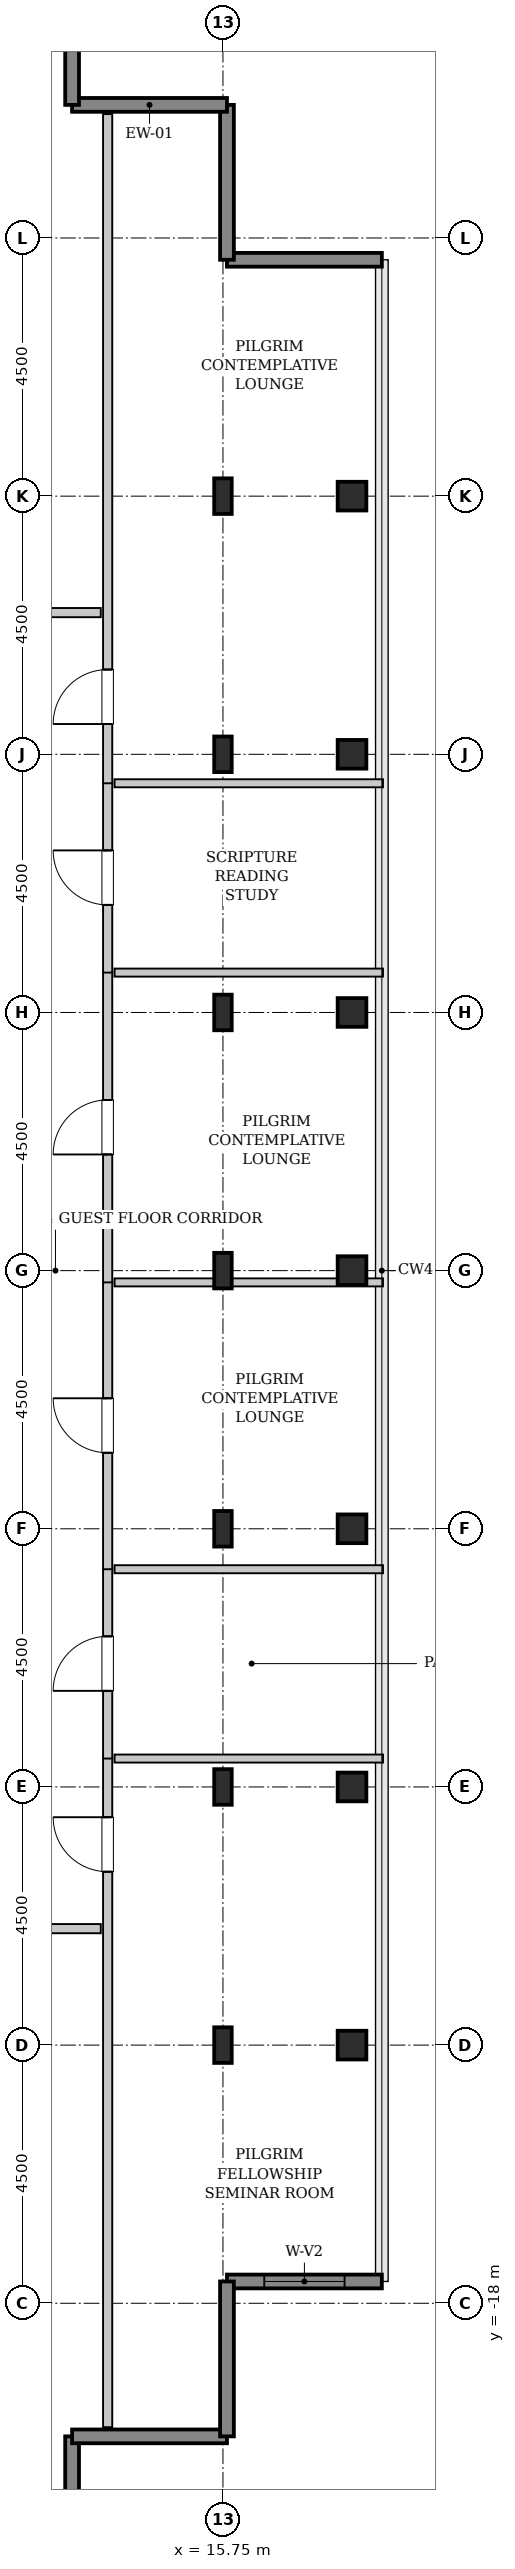
"""IFC4 building model, lengths in metres.
Left out: names, types, materials, properties, quantities, classifications, styles, units other than length and angle.
Written with IfcOpenShell. Run it as: python <this file> out.ifc"""

import sys

from ifc_helpers import new_model, si_unit, direction, frame, frame_2d, origin, origin_2d, place, context, subcontext, project, spatial, rectangle, hollow_rectangle, i_section, extrude, source, transform, mapped, element, fill, save


model = new_model("IFC4")
c1 = context("Model", 3, precision=1e-05, world=origin(), true_north=direction((0.0, 1.0)))
c2 = subcontext(c1, "Body", "Model", "MODEL_VIEW")
j1 = project(units=[si_unit("LENGTHUNIT", "METRE"), si_unit("PLANEANGLEUNIT", "RADIAN")], contexts=[c1])
p1 = place(None, origin())
s1 = spatial("IfcSite", under=j1, at=p1, CompositionType="ELEMENT")
p2 = place(p1, origin())
s2 = spatial("IfcBuilding", under=s1, at=p2, CompositionType="ELEMENT")
p3 = place(p2, frame((0.0, 0.0, 295.0)))
s3 = spatial("IfcBuildingStorey", under=s2, at=p3, CompositionType="ELEMENT", Elevation=295.0)
m1 = source(origin(), c2, "Body", "SweptSolid", [
    extrude(i_section(OverallWidth=0.305, OverallDepth=0.62, WebThickness=0.021, FlangeThickness=0.04, FilletRadius=0.027, at=origin_2d()), origin(), (0.0, 0.0, 1.0), 3.8),
])
for number, where, z_axis, x_axis in (
    (1, (15.75, -13.5, 0.0), (0.0, 0.0, 1.0), (1.0, 0.0, 0.0)),
    (2, (15.75, -9.0, 0.0), (0.0, 0.0, 1.0), (1.0, 0.0, 0.0)),
    (3, (15.75, -4.5, 0.0), (0.0, 0.0, 1.0), (1.0, 0.0, 0.0)),
    (4, (15.75, 0.0, 0.0), (0.0, 0.0, 1.0), (1.0, 0.0, 0.0)),
    (5, (15.75, 4.5, 0.0), (0.0, 0.0, 1.0), (1.0, 0.0, 0.0)),
    (6, (15.75, 9.0, 0.0), (0.0, 0.0, 1.0), (1.0, 0.0, 0.0)),
    (7, (15.75, 13.5, 0.0), (0.0, 0.0, 1.0), (1.0, 0.0, 0.0)),
):
    element("IfcColumn", number, at=place(p3, frame(where, z_axis=z_axis, x_axis=x_axis)), inside=s3, PredefinedType="COLUMN", context=c2, shape_type="MappedRepresentation", body=[
        mapped(m1, transform((0.0, 0.0, 0.0), x_axis=(1.0, 0.0, 0.0), y_axis=(0.0, 1.0, 0.0), z_axis=(0.0, 0.0, 1.0), scale=1.0)),
    ])
m2 = source(origin(), c2, "Body", "SweptSolid", [
    extrude(hollow_rectangle(XDim=0.5, YDim=0.5, WallThickness=0.025, InnerFilletRadius=0.025, OuterFilletRadius=0.05, at=origin_2d()), origin(), (0.0, 0.0, 1.0), 3.8),
])
for number, where, z_axis, x_axis in (
    (8, (18.0, -13.5, 0.0), (0.0, 0.0, 1.0), (1.0, 0.0, 0.0)),
    (9, (18.0, -9.0, 0.0), (0.0, 0.0, 1.0), (1.0, 0.0, 0.0)),
    (10, (18.0, -4.5, 0.0), (0.0, 0.0, 1.0), (1.0, 0.0, 0.0)),
    (11, (18.0, 0.0, 0.0), (0.0, 0.0, 1.0), (1.0, 0.0, 0.0)),
    (12, (18.0, 4.5, 0.0), (0.0, 0.0, 1.0), (1.0, 0.0, 0.0)),
    (13, (18.0, 9.0, 0.0), (0.0, 0.0, 1.0), (1.0, 0.0, 0.0)),
    (14, (18.0, 13.5, 0.0), (0.0, 0.0, 1.0), (1.0, 0.0, 0.0)),
):
    element("IfcColumn", number, at=place(p3, frame(where, z_axis=z_axis, x_axis=x_axis)), inside=s3, PredefinedType="COLUMN", context=c2, shape_type="MappedRepresentation", body=[
        mapped(m2, transform((0.0, 0.0, 0.0), x_axis=(1.0, 0.0, 0.0), y_axis=(0.0, 1.0, 0.0), z_axis=(0.0, 0.0, 1.0), scale=1.0)),
    ])
m3 = source(origin(), c2, "Body", "SweptSolid", [
    extrude(rectangle(XDim=2.7, YDim=0.24, at=frame_2d((1.35, 0.0))), origin(), (0.0, 0.0, 1.0), 3.55),
])
p4 = place(p3, frame((15.82, -17.62, 0.0), z_axis=(0.0, 0.0, 1.0), x_axis=(1.0, 0.0, 0.0)))
e15 = element("IfcWall", 15, at=p4, inside=s3, PredefinedType="SHEAR", context=c2, shape_type="MappedRepresentation", body=[
    mapped(m3, transform((0.0, 0.0, 0.0), x_axis=(1.0, 0.0, 0.0), y_axis=(0.0, 1.0, 0.0), z_axis=(0.0, 0.0, 1.0), scale=1.0)),
])
p5 = place(p4, frame((0.65, 0.0, 0.85)))
e16 = element("IfcOpeningElement", 16, at=p5, cuts=e15, PredefinedType="OPENING", context=c2, shape_type="SweptSolid", body=[
    extrude(rectangle(XDim=1.4, YDim=1.8, at=frame_2d((0.7, 0.9))), frame((0.0, 0.13, 0.0), z_axis=(0.0, -1.0, 0.0), x_axis=(1.0, 0.0, 0.0)), (0.0, 0.0, 1.0), 0.26),
])
for number, where, z_axis, x_axis in (
    (17, (18.52, 17.62, 0.0), (0.0, 0.0, 1.0), (-1.0, 0.0, 0.0)),
    (18, (15.82, 17.62, 0.0), (0.0, 0.0, 1.0), (0.0, 1.0, 0.0)),
    (19, (15.82, 20.32, 0.0), (0.0, 0.0, 1.0), (-1.0, 0.0, 0.0)),
    (20, (13.12, 20.32, 0.0), (0.0, 0.0, 1.0), (0.0, 1.0, 0.0)),
    (21, (13.12, -23.02, 0.0), (0.0, 0.0, 1.0), (0.0, 1.0, 0.0)),
    (22, (13.12, -20.32, 0.0), (0.0, 0.0, 1.0), (1.0, 0.0, 0.0)),
    (23, (15.82, -20.32, 0.0), (0.0, 0.0, 1.0), (0.0, 1.0, 0.0)),
):
    element("IfcWall", number, at=place(p3, frame(where, z_axis=z_axis, x_axis=x_axis)), inside=s3, PredefinedType="SHEAR", context=c2, shape_type="MappedRepresentation", body=[
        mapped(m3, transform((0.0, 0.0, 0.0), x_axis=(1.0, 0.0, 0.0), y_axis=(0.0, 1.0, 0.0), z_axis=(0.0, 0.0, 1.0), scale=1.0)),
    ])
m4 = source(origin(), c2, "Body", "SweptSolid", [
    extrude(rectangle(XDim=11.665, YDim=0.16, at=frame_2d((5.833, 0.0))), origin(), (0.0, 0.0, 1.0), 3.535),
])
p6 = place(p3, frame((13.74, -20.16, 0.0), z_axis=(0.0, 0.0, 1.0), x_axis=(0.0, 1.0, 0.0)))
e24 = element("IfcWall", 24, at=p6, inside=s3, PredefinedType="PARTITIONING", context=c2, shape_type="MappedRepresentation", body=[
    mapped(m4, transform((0.0, 0.0, 0.0), x_axis=(1.0, 0.0, 0.0), y_axis=(0.0, 1.0, 0.0), z_axis=(0.0, 0.0, 1.0), scale=1.0)),
])
p7 = place(p6, frame((9.683, 0.0, 0.0)))
e25 = element("IfcOpeningElement", 25, at=p7, cuts=e24, PredefinedType="OPENING", context=c2, shape_type="SweptSolid", body=[
    extrude(rectangle(XDim=0.95, YDim=2.1, at=frame_2d((0.475, 1.05))), frame((0.0, 0.09, 0.0), z_axis=(0.0, -1.0, 0.0), x_axis=(1.0, 0.0, 0.0)), (0.0, 0.0, 1.0), 0.18),
])
m5 = source(origin(), c2, "Body", "SweptSolid", [
    extrude(rectangle(XDim=4.68, YDim=0.14, at=frame_2d((2.34, 0.0))), origin(), (0.0, 0.0, 1.0), 2.925),
])
p8 = place(p3, frame((13.86, -8.505, 0.0), z_axis=(0.0, 0.0, 1.0), x_axis=(1.0, 0.0, 0.0)))
e26 = element("IfcWall", 26, at=p8, inside=s3, PredefinedType="PARTITIONING", context=c2, shape_type="MappedRepresentation", body=[
    mapped(m5, transform((0.0, 0.0, 0.0), x_axis=(1.0, 0.0, 0.0), y_axis=(0.0, 1.0, 0.0), z_axis=(0.0, 0.0, 1.0), scale=1.0)),
])
m6 = source(origin(), c2, "Body", "SweptSolid", [
    extrude(rectangle(XDim=3.31, YDim=0.16, at=frame_2d((1.655, 0.0))), origin(), (0.0, 0.0, 1.0), 3.535),
])
p9 = place(p3, frame((13.74, -8.505, 0.0), z_axis=(0.0, 0.0, 1.0), x_axis=(0.0, 1.0, 0.0)))
e27 = element("IfcWall", 27, at=p9, inside=s3, PredefinedType="PARTITIONING", context=c2, shape_type="MappedRepresentation", body=[
    mapped(m6, transform((0.0, 0.0, 0.0), x_axis=(1.0, 0.0, 0.0), y_axis=(0.0, 1.0, 0.0), z_axis=(0.0, 0.0, 1.0), scale=1.0)),
])
p10 = place(p9, frame((1.18, 0.0, 0.0)))
e28 = element("IfcOpeningElement", 28, at=p10, cuts=e27, PredefinedType="OPENING", context=c2, shape_type="SweptSolid", body=[
    extrude(rectangle(XDim=0.95, YDim=2.1, at=frame_2d((0.475, 1.05))), frame((0.0, 0.09, 0.0), z_axis=(0.0, -1.0, 0.0), x_axis=(1.0, 0.0, 0.0)), (0.0, 0.0, 1.0), 0.18),
])
m7 = source(origin(), c2, "Body", "SweptSolid", [
    extrude(rectangle(XDim=4.68, YDim=0.14, at=frame_2d((2.34, 0.0))), origin(), (0.0, 0.0, 1.0), 3.535),
])
p11 = place(p3, frame((13.86, -5.205, 0.0), z_axis=(0.0, 0.0, 1.0), x_axis=(1.0, 0.0, 0.0)))
e29 = element("IfcWall", 29, at=p11, inside=s3, PredefinedType="PARTITIONING", context=c2, shape_type="MappedRepresentation", body=[
    mapped(m7, transform((0.0, 0.0, 0.0), x_axis=(1.0, 0.0, 0.0), y_axis=(0.0, 1.0, 0.0), z_axis=(0.0, 0.0, 1.0), scale=1.0)),
])
m8 = source(origin(), c2, "Body", "SweptSolid", [
    extrude(rectangle(XDim=5.01, YDim=0.16, at=frame_2d((2.505, 0.0))), origin(), (0.0, 0.0, 1.0), 3.535),
])
p12 = place(p3, frame((13.74, -5.205, 0.0), z_axis=(0.0, 0.0, 1.0), x_axis=(0.0, 1.0, 0.0)))
e30 = element("IfcWall", 30, at=p12, inside=s3, PredefinedType="PARTITIONING", context=c2, shape_type="MappedRepresentation", body=[
    mapped(m8, transform((0.0, 0.0, 0.0), x_axis=(1.0, 0.0, 0.0), y_axis=(0.0, 1.0, 0.0), z_axis=(0.0, 0.0, 1.0), scale=1.0)),
])
p13 = place(p12, frame((2.03, 0.0, 0.0)))
e31 = element("IfcOpeningElement", 31, at=p13, cuts=e30, PredefinedType="OPENING", context=c2, shape_type="SweptSolid", body=[
    extrude(rectangle(XDim=0.95, YDim=2.1, at=frame_2d((0.475, 1.05))), frame((0.0, 0.09, 0.0), z_axis=(0.0, -1.0, 0.0), x_axis=(1.0, 0.0, 0.0)), (0.0, 0.0, 1.0), 0.18),
])
p14 = place(p3, frame((13.86, -0.205, 0.0), z_axis=(0.0, 0.0, 1.0), x_axis=(1.0, 0.0, 0.0)))
e32 = element("IfcWall", 32, at=p14, inside=s3, PredefinedType="PARTITIONING", context=c2, shape_type="MappedRepresentation", body=[
    mapped(m5, transform((0.0, 0.0, 0.0), x_axis=(1.0, 0.0, 0.0), y_axis=(0.0, 1.0, 0.0), z_axis=(0.0, 0.0, 1.0), scale=1.0)),
])
m9 = source(origin(), c2, "Body", "SweptSolid", [
    extrude(rectangle(XDim=5.41, YDim=0.16, at=frame_2d((2.705, 0.0))), origin(), (0.0, 0.0, 1.0), 3.535),
])
p15 = place(p3, frame((13.74, -0.205, 0.0), z_axis=(0.0, 0.0, 1.0), x_axis=(0.0, 1.0, 0.0)))
e33 = element("IfcWall", 33, at=p15, inside=s3, PredefinedType="PARTITIONING", context=c2, shape_type="MappedRepresentation", body=[
    mapped(m9, transform((0.0, 0.0, 0.0), x_axis=(1.0, 0.0, 0.0), y_axis=(0.0, 1.0, 0.0), z_axis=(0.0, 0.0, 1.0), scale=1.0)),
])
p16 = place(p15, frame((2.23, 0.0, 0.0)))
e34 = element("IfcOpeningElement", 34, at=p16, cuts=e33, PredefinedType="OPENING", context=c2, shape_type="SweptSolid", body=[
    extrude(rectangle(XDim=0.95, YDim=2.1, at=frame_2d((0.475, 1.05))), frame((0.0, 0.09, 0.0), z_axis=(0.0, -1.0, 0.0), x_axis=(1.0, 0.0, 0.0)), (0.0, 0.0, 1.0), 0.18),
])
p17 = place(p3, frame((13.86, 5.195, 0.0), z_axis=(0.0, 0.0, 1.0), x_axis=(1.0, 0.0, 0.0)))
e35 = element("IfcWall", 35, at=p17, inside=s3, PredefinedType="PARTITIONING", context=c2, shape_type="MappedRepresentation", body=[
    mapped(m7, transform((0.0, 0.0, 0.0), x_axis=(1.0, 0.0, 0.0), y_axis=(0.0, 1.0, 0.0), z_axis=(0.0, 0.0, 1.0), scale=1.0)),
])
p18 = place(p3, frame((13.74, 5.195, 0.0), z_axis=(0.0, 0.0, 1.0), x_axis=(0.0, 1.0, 0.0)))
e36 = element("IfcWall", 36, at=p18, inside=s3, PredefinedType="PARTITIONING", context=c2, shape_type="MappedRepresentation", body=[
    mapped(m6, transform((0.0, 0.0, 0.0), x_axis=(1.0, 0.0, 0.0), y_axis=(0.0, 1.0, 0.0), z_axis=(0.0, 0.0, 1.0), scale=1.0)),
])
p19 = place(p18, frame((1.18, 0.0, 0.0)))
e37 = element("IfcOpeningElement", 37, at=p19, cuts=e36, PredefinedType="OPENING", context=c2, shape_type="SweptSolid", body=[
    extrude(rectangle(XDim=0.95, YDim=2.1, at=frame_2d((0.475, 1.05))), frame((0.0, 0.09, 0.0), z_axis=(0.0, -1.0, 0.0), x_axis=(1.0, 0.0, 0.0)), (0.0, 0.0, 1.0), 0.18),
])
p20 = place(p3, frame((13.86, 8.495, 0.0), z_axis=(0.0, 0.0, 1.0), x_axis=(1.0, 0.0, 0.0)))
e38 = element("IfcWall", 38, at=p20, inside=s3, PredefinedType="PARTITIONING", context=c2, shape_type="MappedRepresentation", body=[
    mapped(m5, transform((0.0, 0.0, 0.0), x_axis=(1.0, 0.0, 0.0), y_axis=(0.0, 1.0, 0.0), z_axis=(0.0, 0.0, 1.0), scale=1.0)),
])
p21 = place(p3, frame((13.74, 8.495, 0.0), z_axis=(0.0, 0.0, 1.0), x_axis=(0.0, 1.0, 0.0)))
e39 = element("IfcWall", 39, at=p21, inside=s3, PredefinedType="PARTITIONING", context=c2, shape_type="MappedRepresentation", body=[
    mapped(m4, transform((0.0, 0.0, 0.0), x_axis=(1.0, 0.0, 0.0), y_axis=(0.0, 1.0, 0.0), z_axis=(0.0, 0.0, 1.0), scale=1.0)),
])
p22 = place(p21, frame((1.032, 0.0, 0.0)))
e40 = element("IfcOpeningElement", 40, at=p22, cuts=e39, PredefinedType="OPENING", context=c2, shape_type="SweptSolid", body=[
    extrude(rectangle(XDim=0.95, YDim=2.1, at=frame_2d((0.475, 1.05))), frame((0.0, 0.09, 0.0), z_axis=(0.0, -1.0, 0.0), x_axis=(1.0, 0.0, 0.0)), (0.0, 0.0, 1.0), 0.18),
])
m10 = source(origin(), c2, "Body", "SweptSolid", [
    extrude(rectangle(XDim=5.825, YDim=0.16, at=frame_2d((2.913, 0.0))), origin(), (0.0, 0.0, 1.0), 3.535),
])
p23 = place(p3, frame((7.795, 11.47, 0.0), z_axis=(0.0, 0.0, 1.0), x_axis=(1.0, 0.0, 0.0)))
e41 = element("IfcWall", 41, at=p23, inside=s3, PredefinedType="PARTITIONING", context=c2, shape_type="MappedRepresentation", body=[
    mapped(m10, transform((0.0, 0.0, 0.0), x_axis=(1.0, 0.0, 0.0), y_axis=(0.0, 1.0, 0.0), z_axis=(0.0, 0.0, 1.0), scale=1.0)),
])
p24 = place(p23, frame((2.438, 0.0, 0.0)))
e42 = element("IfcOpeningElement", 42, at=p24, cuts=e41, PredefinedType="OPENING", context=c2, shape_type="SweptSolid", body=[
    extrude(rectangle(XDim=0.95, YDim=2.1, at=frame_2d((0.475, 1.05))), frame((0.0, 0.09, 0.0), z_axis=(0.0, -1.0, 0.0), x_axis=(1.0, 0.0, 0.0)), (0.0, 0.0, 1.0), 0.18),
])
p25 = place(p3, frame((7.795, -11.47, 0.0), z_axis=(0.0, 0.0, 1.0), x_axis=(1.0, 0.0, 0.0)))
e43 = element("IfcWall", 43, at=p25, inside=s3, PredefinedType="PARTITIONING", context=c2, shape_type="MappedRepresentation", body=[
    mapped(m10, transform((0.0, 0.0, 0.0), x_axis=(1.0, 0.0, 0.0), y_axis=(0.0, 1.0, 0.0), z_axis=(0.0, 0.0, 1.0), scale=1.0)),
])
p26 = place(p25, frame((2.438, 0.0, 0.0)))
e44 = element("IfcOpeningElement", 44, at=p26, cuts=e43, PredefinedType="OPENING", context=c2, shape_type="SweptSolid", body=[
    extrude(rectangle(XDim=0.95, YDim=2.1, at=frame_2d((0.475, 1.05))), frame((0.0, 0.09, 0.0), z_axis=(0.0, -1.0, 0.0), x_axis=(1.0, 0.0, 0.0)), (0.0, 0.0, 1.0), 0.18),
])
m11 = source(origin(), c2, "Body", "SweptSolid", [
    extrude(rectangle(XDim=1.4, YDim=1.8, at=frame_2d((0.7, 0.9))), frame((0.0, 0.03, 0.0), z_axis=(0.0, -1.0, 0.0), x_axis=(1.0, 0.0, 0.0)), (0.0, 0.0, 1.0), 0.06),
])
p27 = place(p5, origin())
e45 = element("IfcWindow", 45, at=p27, inside=s3, PartitioningType="SINGLE_PANEL", PredefinedType="WINDOW", context=c2, shape_type="MappedRepresentation", body=[
    mapped(m11, transform((0.0, 0.0, 0.0), x_axis=(1.0, 0.0, 0.0), y_axis=(0.0, 1.0, 0.0), z_axis=(0.0, 0.0, 1.0), scale=1.0)),
])
fill(e16, e45)
m12 = source(origin(), c2, "Body", "SweptSolid", [
    extrude(rectangle(XDim=0.95, YDim=2.1, at=frame_2d((0.475, 1.05))), frame((0.0, 0.025, 0.0), z_axis=(0.0, -1.0, 0.0), x_axis=(1.0, 0.0, 0.0)), (0.0, 0.0, 1.0), 0.05),
])
p28 = place(p7, origin())
e46 = element("IfcDoor", 46, at=p28, inside=s3, OperationType="SINGLE_SWING_RIGHT", PredefinedType="DOOR", context=c2, shape_type="MappedRepresentation", body=[
    mapped(m12, transform((0.0, 0.0, 0.0), x_axis=(1.0, 0.0, 0.0), y_axis=(0.0, 1.0, 0.0), z_axis=(0.0, 0.0, 1.0), scale=1.0)),
])
fill(e25, e46)
p29 = place(p10, origin())
e47 = element("IfcDoor", 47, at=p29, inside=s3, OperationType="SINGLE_SWING_LEFT", PredefinedType="DOOR", context=c2, shape_type="MappedRepresentation", body=[
    mapped(m12, transform((0.0, 0.0, 0.0), x_axis=(1.0, 0.0, 0.0), y_axis=(0.0, 1.0, 0.0), z_axis=(0.0, 0.0, 1.0), scale=1.0)),
])
fill(e28, e47)
p30 = place(p13, origin())
e48 = element("IfcDoor", 48, at=p30, inside=s3, OperationType="SINGLE_SWING_RIGHT", PredefinedType="DOOR", context=c2, shape_type="MappedRepresentation", body=[
    mapped(m12, transform((0.0, 0.0, 0.0), x_axis=(1.0, 0.0, 0.0), y_axis=(0.0, 1.0, 0.0), z_axis=(0.0, 0.0, 1.0), scale=1.0)),
])
fill(e31, e48)
p31 = place(p16, origin())
e49 = element("IfcDoor", 49, at=p31, inside=s3, OperationType="SINGLE_SWING_LEFT", PredefinedType="DOOR", context=c2, shape_type="MappedRepresentation", body=[
    mapped(m12, transform((0.0, 0.0, 0.0), x_axis=(1.0, 0.0, 0.0), y_axis=(0.0, 1.0, 0.0), z_axis=(0.0, 0.0, 1.0), scale=1.0)),
])
fill(e34, e49)
p32 = place(p19, origin())
e50 = element("IfcDoor", 50, at=p32, inside=s3, OperationType="SINGLE_SWING_RIGHT", PredefinedType="DOOR", context=c2, shape_type="MappedRepresentation", body=[
    mapped(m12, transform((0.0, 0.0, 0.0), x_axis=(1.0, 0.0, 0.0), y_axis=(0.0, 1.0, 0.0), z_axis=(0.0, 0.0, 1.0), scale=1.0)),
])
fill(e37, e50)
p33 = place(p22, origin())
e51 = element("IfcDoor", 51, at=p33, inside=s3, OperationType="SINGLE_SWING_LEFT", PredefinedType="DOOR", context=c2, shape_type="MappedRepresentation", body=[
    mapped(m12, transform((0.0, 0.0, 0.0), x_axis=(1.0, 0.0, 0.0), y_axis=(0.0, 1.0, 0.0), z_axis=(0.0, 0.0, 1.0), scale=1.0)),
])
fill(e40, e51)
save(model, sys.argv[1])
